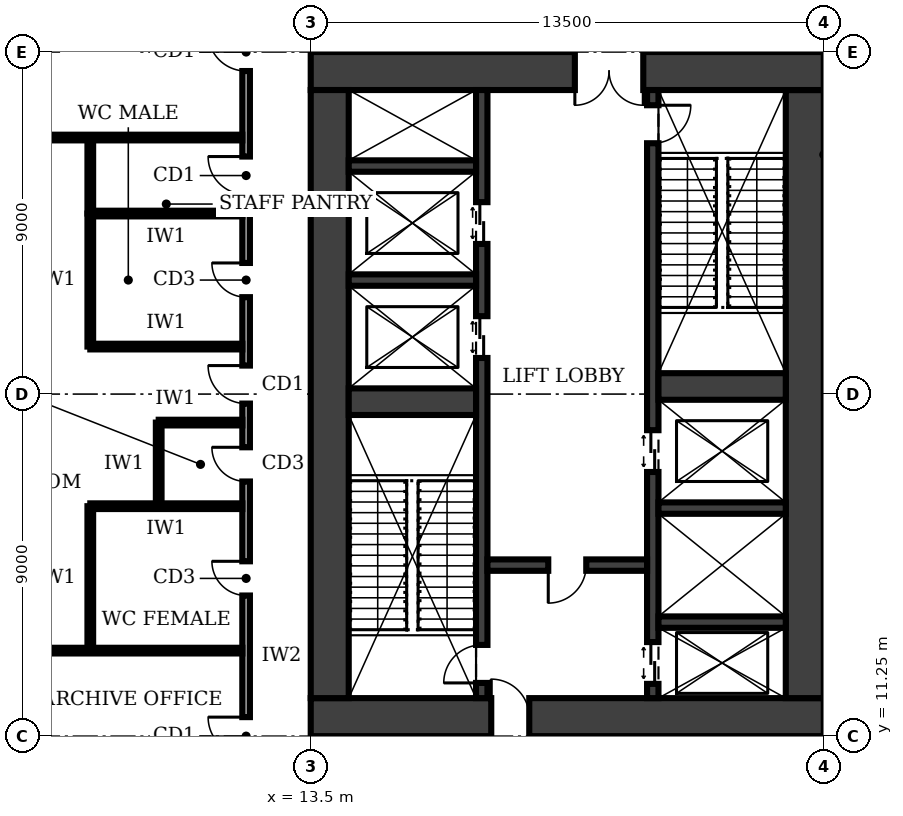
"""IFC4 building model, lengths in metres.
Left out: names, types, materials, properties, quantities, classifications, styles, units other than length and angle.
Written with IfcOpenShell. Run it as: python <this file> out.ifc"""

import sys

from ifc_helpers import new_model, si_unit, direction, frame, frame_2d, origin, place, context, subcontext, project, spatial, rectangle, extrude, element, fill, save


model = new_model("IFC4")
c1 = context("Model", 3, precision=1e-05, world=origin(), true_north=direction((0.0, 1.0)))
c2 = subcontext(c1, "Body", "Model", "MODEL_VIEW")
j1 = project(units=[si_unit("LENGTHUNIT", "METRE"), si_unit("PLANEANGLEUNIT", "RADIAN")], contexts=[c1])
p1 = place(None, origin())
s1 = spatial("IfcSite", under=j1, at=p1, CompositionType="ELEMENT")
p2 = place(p1, origin())
s2 = spatial("IfcBuilding", under=s1, at=p2, CompositionType="ELEMENT")
p3 = place(p2, frame((0.0, 0.0, 16.0)))
s3 = spatial("IfcBuildingStorey", under=s2, at=p3, CompositionType="ELEMENT", Elevation=16.0)
p4 = place(p3, frame((13.5, 11.75, 0.0), z_axis=(0.0, 0.0, 1.0), x_axis=(1.0, 0.0, 0.0)))
e1 = element("IfcWall", 1, at=p4, inside=s3, PredefinedType="SHEAR", context=c2, shape_type="SweptSolid", body=[
    extrude(rectangle(XDim=13.5, YDim=1.0, at=frame_2d((6.75, 0.0))), origin(), (0.0, 0.0, 1.0), 5.0),
])
p5 = place(p4, frame((4.75, 0.0, 0.0)))
e2 = element("IfcOpeningElement", 2, at=p5, cuts=e1, PredefinedType="OPENING", context=c2, shape_type="SweptSolid", body=[
    extrude(rectangle(XDim=1.0, YDim=2.1, at=frame_2d((0.5, 1.05))), frame((0.0, 0.51, 0.0), z_axis=(0.0, -1.0, 0.0), x_axis=(1.0, 0.0, 0.0)), (0.0, 0.0, 1.0), 1.02),
])
p6 = place(p3, frame((26.5, 12.25, 0.0), z_axis=(0.0, 0.0, 1.0), x_axis=(0.0, 1.0, 0.0)))
e3 = element("IfcWall", 3, at=p6, inside=s3, PredefinedType="SHEAR", context=c2, shape_type="SweptSolid", body=[
    extrude(rectangle(XDim=16.0, YDim=1.0, at=frame_2d((8.0, 0.0))), origin(), (0.0, 0.0, 1.0), 5.0),
])
p7 = place(p3, frame((27.0, 28.75, 0.0), z_axis=(0.0, 0.0, 1.0), x_axis=(-1.0, 0.0, 0.0)))
e4 = element("IfcWall", 4, at=p7, inside=s3, PredefinedType="SHEAR", context=c2, shape_type="SweptSolid", body=[
    extrude(rectangle(XDim=13.5, YDim=1.0, at=frame_2d((6.75, 0.0))), origin(), (0.0, 0.0, 1.0), 5.0),
])
p8 = place(p7, frame((4.75, 0.0, 0.0)))
e5 = element("IfcOpeningElement", 5, at=p8, cuts=e4, PredefinedType="OPENING", context=c2, shape_type="SweptSolid", body=[
    extrude(rectangle(XDim=1.8, YDim=2.1, at=frame_2d((0.9, 1.05))), frame((0.0, 0.51, 0.0), z_axis=(0.0, -1.0, 0.0), x_axis=(1.0, 0.0, 0.0)), (0.0, 0.0, 1.0), 1.02),
])
p9 = place(p3, frame((14.0, 28.25, 0.0), z_axis=(0.0, 0.0, 1.0), x_axis=(0.0, -1.0, 0.0)))
e6 = element("IfcWall", 6, at=p9, inside=s3, PredefinedType="SHEAR", context=c2, shape_type="SweptSolid", body=[
    extrude(rectangle(XDim=16.0, YDim=1.0, at=frame_2d((8.0, 0.0))), origin(), (0.0, 0.0, 1.0), 5.0),
])
p10 = place(p3, frame((18.0, 12.25, 0.0), z_axis=(0.0, 0.0, 1.0), x_axis=(0.0, 1.0, 0.0)))
e7 = element("IfcWall", 7, at=p10, inside=s3, PredefinedType="SHEAR", context=c2, shape_type="SweptSolid", body=[
    extrude(rectangle(XDim=16.0, YDim=0.3, at=frame_2d((8.0, 0.0))), origin(), (0.0, 0.0, 1.0), 5.0),
])
p11 = place(p10, frame((0.4, 0.0, 0.0)))
e8 = element("IfcOpeningElement", 8, at=p11, cuts=e7, PredefinedType="OPENING", context=c2, shape_type="SweptSolid", body=[
    extrude(rectangle(XDim=1.0, YDim=2.1, at=frame_2d((0.5, 1.05))), frame((0.0, 0.16, 0.0), z_axis=(0.0, -1.0, 0.0), x_axis=(1.0, 0.0, 0.0)), (0.0, 0.0, 1.0), 0.32),
])
p12 = place(p10, frame((8.95, 0.0, 0.0)))
e9 = element("IfcOpeningElement", 9, at=p12, cuts=e7, PredefinedType="OPENING", context=c2, shape_type="SweptSolid", body=[
    extrude(rectangle(XDim=1.1, YDim=2.1, at=frame_2d((0.55, 1.05))), frame((0.0, 0.16, 0.0), z_axis=(0.0, -1.0, 0.0), x_axis=(1.0, 0.0, 0.0)), (0.0, 0.0, 1.0), 0.32),
])
p13 = place(p10, frame((11.95, 0.0, 0.0)))
e10 = element("IfcOpeningElement", 10, at=p13, cuts=e7, PredefinedType="OPENING", context=c2, shape_type="SweptSolid", body=[
    extrude(rectangle(XDim=1.1, YDim=2.1, at=frame_2d((0.55, 1.05))), frame((0.0, 0.16, 0.0), z_axis=(0.0, -1.0, 0.0), x_axis=(1.0, 0.0, 0.0)), (0.0, 0.0, 1.0), 0.32),
])
p14 = place(p3, frame((22.5, 12.25, 0.0), z_axis=(0.0, 0.0, 1.0), x_axis=(0.0, 1.0, 0.0)))
e11 = element("IfcWall", 11, at=p14, inside=s3, PredefinedType="SHEAR", context=c2, shape_type="SweptSolid", body=[
    extrude(rectangle(XDim=16.0, YDim=0.3, at=frame_2d((8.0, 0.0))), origin(), (0.0, 0.0, 1.0), 5.0),
])
p15 = place(p14, frame((14.6, 0.0, 0.0)))
e12 = element("IfcOpeningElement", 12, at=p15, cuts=e11, PredefinedType="OPENING", context=c2, shape_type="SweptSolid", body=[
    extrude(rectangle(XDim=1.0, YDim=2.1, at=frame_2d((0.5, 1.05))), frame((0.0, 0.16, 0.0), z_axis=(0.0, -1.0, 0.0), x_axis=(1.0, 0.0, 0.0)), (0.0, 0.0, 1.0), 0.32),
])
p16 = place(p14, frame((0.375, 0.0, 0.0)))
e13 = element("IfcOpeningElement", 13, at=p16, cuts=e11, PredefinedType="OPENING", context=c2, shape_type="SweptSolid", body=[
    extrude(rectangle(XDim=1.1, YDim=2.1, at=frame_2d((0.55, 1.05))), frame((0.0, 0.16, 0.0), z_axis=(0.0, -1.0, 0.0), x_axis=(1.0, 0.0, 0.0)), (0.0, 0.0, 1.0), 0.32),
])
p17 = place(p14, frame((5.95, 0.0, 0.0)))
e14 = element("IfcOpeningElement", 14, at=p17, cuts=e11, PredefinedType="OPENING", context=c2, shape_type="SweptSolid", body=[
    extrude(rectangle(XDim=1.1, YDim=2.1, at=frame_2d((0.55, 1.05))), frame((0.0, 0.16, 0.0), z_axis=(0.0, -1.0, 0.0), x_axis=(1.0, 0.0, 0.0)), (0.0, 0.0, 1.0), 0.32),
])
p18 = place(p3, frame((14.5, 20.05, 0.0), z_axis=(0.0, 0.0, 1.0), x_axis=(1.0, 0.0, 0.0)))
e15 = element("IfcWall", 15, at=p18, inside=s3, PredefinedType="SHEAR", context=c2, shape_type="SweptSolid", body=[
    extrude(rectangle(XDim=3.35, YDim=0.7, at=frame_2d((1.675, 0.0))), origin(), (0.0, 0.0, 1.0), 5.0),
])
p19 = place(p3, frame((18.15, 15.75, 0.0), z_axis=(0.0, 0.0, 1.0), x_axis=(1.0, 0.0, 0.0)))
e16 = element("IfcWall", 16, at=p19, inside=s3, PredefinedType="SHEAR", context=c2, shape_type="SweptSolid", body=[
    extrude(rectangle(XDim=4.2, YDim=0.3, at=frame_2d((2.1, 0.0))), origin(), (0.0, 0.0, 1.0), 5.0),
])
p20 = place(p19, frame((1.6, 0.0, 0.0)))
e17 = element("IfcOpeningElement", 17, at=p20, cuts=e16, PredefinedType="OPENING", context=c2, shape_type="SweptSolid", body=[
    extrude(rectangle(XDim=1.0, YDim=2.1, at=frame_2d((0.5, 1.05))), frame((0.0, 0.16, 0.0), z_axis=(0.0, -1.0, 0.0), x_axis=(1.0, 0.0, 0.0)), (0.0, 0.0, 1.0), 0.32),
])
for number, where, z_axis, x_axis in (
    (18, (22.65, 14.25, 0.0), (0.0, 0.0, 1.0), (1.0, 0.0, 0.0)),
    (19, (22.65, 17.25, 0.0), (0.0, 0.0, 1.0), (1.0, 0.0, 0.0)),
):
    element("IfcWall", number, at=place(p3, frame(where, z_axis=z_axis, x_axis=x_axis)), inside=s3, PredefinedType="SHEAR", context=c2, shape_type="SweptSolid", body=[
        extrude(rectangle(XDim=3.35, YDim=0.3, at=frame_2d((1.675, 0.0))), origin(), (0.0, 0.0, 1.0), 5.0),
    ])
p21 = place(p3, frame((22.65, 20.45, 0.0), z_axis=(0.0, 0.0, 1.0), x_axis=(1.0, 0.0, 0.0)))
e20 = element("IfcWall", 20, at=p21, inside=s3, PredefinedType="SHEAR", context=c2, shape_type="SweptSolid", body=[
    extrude(rectangle(XDim=3.35, YDim=0.7, at=frame_2d((1.675, 0.0))), origin(), (0.0, 0.0, 1.0), 5.0),
])
for number, where, z_axis, x_axis in (
    (21, (14.5, 23.25, 0.0), (0.0, 0.0, 1.0), (1.0, 0.0, 0.0)),
    (22, (14.5, 26.25, 0.0), (0.0, 0.0, 1.0), (1.0, 0.0, 0.0)),
):
    element("IfcWall", number, at=place(p3, frame(where, z_axis=z_axis, x_axis=x_axis)), inside=s3, PredefinedType="SHEAR", context=c2, shape_type="SweptSolid", body=[
        extrude(rectangle(XDim=3.35, YDim=0.3, at=frame_2d((1.675, 0.0))), origin(), (0.0, 0.0, 1.0), 5.0),
    ])
p22 = place(p3, frame((11.8, 31.3, 0.0), z_axis=(0.0, 0.0, 1.0), x_axis=(0.0, -1.0, 0.0)))
e23 = element("IfcWall", 23, at=p22, inside=s3, PredefinedType="SOLIDWALL", context=c2, shape_type="SweptSolid", body=[
    extrude(rectangle(XDim=22.3, YDim=0.2, at=frame_2d((11.15, 0.0))), origin(), (0.0, 0.0, 1.0), 4.7),
])
p23 = place(p22, frame((19.55, 0.0, 0.0)))
e24 = element("IfcOpeningElement", 24, at=p23, cuts=e23, PredefinedType="OPENING", context=c2, shape_type="SweptSolid", body=[
    extrude(rectangle(XDim=1.0, YDim=2.1, at=frame_2d((0.5, 1.05))), frame((0.0, 0.11, 0.0), z_axis=(0.0, -1.0, 0.0), x_axis=(1.0, 0.0, 0.0)), (0.0, 0.0, 1.0), 0.22),
])
p24 = place(p22, frame((15.45, 0.0, 0.0)))
e25 = element("IfcOpeningElement", 25, at=p24, cuts=e23, PredefinedType="OPENING", context=c2, shape_type="SweptSolid", body=[
    extrude(rectangle(XDim=0.9, YDim=2.1, at=frame_2d((0.45, 1.05))), frame((0.0, 0.11, 0.0), z_axis=(0.0, -1.0, 0.0), x_axis=(1.0, 0.0, 0.0)), (0.0, 0.0, 1.0), 0.22),
])
p25 = place(p22, frame((12.45, 0.0, 0.0)))
e26 = element("IfcOpeningElement", 26, at=p25, cuts=e23, PredefinedType="OPENING", context=c2, shape_type="SweptSolid", body=[
    extrude(rectangle(XDim=0.9, YDim=2.1, at=frame_2d((0.45, 1.05))), frame((0.0, 0.11, 0.0), z_axis=(0.0, -1.0, 0.0), x_axis=(1.0, 0.0, 0.0)), (0.0, 0.0, 1.0), 0.22),
])
p26 = place(p22, frame((7.6, 0.0, 0.0)))
e27 = element("IfcOpeningElement", 27, at=p26, cuts=e23, PredefinedType="OPENING", context=c2, shape_type="SweptSolid", body=[
    extrude(rectangle(XDim=0.9, YDim=2.1, at=frame_2d((0.45, 1.05))), frame((0.0, 0.11, 0.0), z_axis=(0.0, -1.0, 0.0), x_axis=(1.0, 0.0, 0.0)), (0.0, 0.0, 1.0), 0.22),
])
p27 = place(p22, frame((4.8, 0.0, 0.0)))
e28 = element("IfcOpeningElement", 28, at=p27, cuts=e23, PredefinedType="OPENING", context=c2, shape_type="SweptSolid", body=[
    extrude(rectangle(XDim=1.0, YDim=2.1, at=frame_2d((0.5, 1.05))), frame((0.0, 0.11, 0.0), z_axis=(0.0, -1.0, 0.0), x_axis=(1.0, 0.0, 0.0)), (0.0, 0.0, 1.0), 0.22),
])
p28 = place(p22, frame((10.3, 0.0, 0.0)))
e29 = element("IfcOpeningElement", 29, at=p28, cuts=e23, PredefinedType="OPENING", context=c2, shape_type="SweptSolid", body=[
    extrude(rectangle(XDim=1.0, YDim=2.1, at=frame_2d((0.5, 1.05))), frame((0.0, 0.11, 0.0), z_axis=(0.0, -1.0, 0.0), x_axis=(1.0, 0.0, 0.0)), (0.0, 0.0, 1.0), 0.22),
])
p29 = place(p22, frame((1.55, 0.0, 0.0)))
e30 = element("IfcOpeningElement", 30, at=p29, cuts=e23, PredefinedType="OPENING", context=c2, shape_type="SweptSolid", body=[
    extrude(rectangle(XDim=1.0, YDim=2.1, at=frame_2d((0.5, 1.05))), frame((0.0, 0.11, 0.0), z_axis=(0.0, -1.0, 0.0), x_axis=(1.0, 0.0, 0.0)), (0.0, 0.0, 1.0), 0.22),
])
for number, where, z_axis, x_axis in (
    (31, (0.3, 13.5, 0.0), (0.0, 0.0, 1.0), (1.0, 0.0, 0.0)),
    (32, (0.3, 27.0, 0.0), (0.0, 0.0, 1.0), (1.0, 0.0, 0.0)),
):
    element("IfcWall", number, at=place(p3, frame(where, z_axis=z_axis, x_axis=x_axis)), inside=s3, PredefinedType="PARTITIONING", context=c2, shape_type="SweptSolid", body=[
        extrude(rectangle(XDim=11.4, YDim=0.15, at=frame_2d((5.7, 0.0))), origin(), (0.0, 0.0, 1.0), 4.7),
    ])
p30 = place(p3, frame((11.7, 17.3, 0.0), z_axis=(0.0, 0.0, 1.0), x_axis=(-1.0, 0.0, 0.0)))
e33 = element("IfcWall", 33, at=p30, inside=s3, PredefinedType="PARTITIONING", context=c2, shape_type="SweptSolid", body=[
    extrude(rectangle(XDim=4.0, YDim=0.15, at=frame_2d((2.0, 0.0))), origin(), (0.0, 0.0, 1.0), 4.7),
])
p31 = place(p3, frame((11.7, 19.5, 0.0), z_axis=(0.0, 0.0, 1.0), x_axis=(-1.0, 0.0, 0.0)))
e34 = element("IfcWall", 34, at=p31, inside=s3, PredefinedType="PARTITIONING", context=c2, shape_type="SweptSolid", body=[
    extrude(rectangle(XDim=2.2, YDim=0.15, at=frame_2d((1.1, 0.0))), origin(), (0.0, 0.0, 1.0), 3.8),
])
for number, where, z_axis, x_axis in (
    (35, (11.7, 21.5, 0.0), (0.0, 0.0, 1.0), (-1.0, 0.0, 0.0)),
    (36, (11.7, 25.0, 0.0), (0.0, 0.0, 1.0), (-1.0, 0.0, 0.0)),
):
    element("IfcWall", number, at=place(p3, frame(where, z_axis=z_axis, x_axis=x_axis)), inside=s3, PredefinedType="PARTITIONING", context=c2, shape_type="SweptSolid", body=[
        extrude(rectangle(XDim=4.0, YDim=0.15, at=frame_2d((2.0, 0.0))), origin(), (0.0, 0.0, 1.0), 4.7),
    ])
p32 = place(p3, frame((7.7, 13.5, 0.0), z_axis=(0.0, 0.0, 1.0), x_axis=(0.0, 1.0, 0.0)))
e37 = element("IfcWall", 37, at=p32, inside=s3, PredefinedType="PARTITIONING", context=c2, shape_type="SweptSolid", body=[
    extrude(rectangle(XDim=3.8, YDim=0.15, at=frame_2d((1.9, 0.0))), origin(), (0.0, 0.0, 1.0), 4.7),
])
p33 = place(p3, frame((9.5, 17.3, 0.0), z_axis=(0.0, 0.0, 1.0), x_axis=(0.0, 1.0, 0.0)))
e38 = element("IfcWall", 38, at=p33, inside=s3, PredefinedType="PARTITIONING", context=c2, shape_type="SweptSolid", body=[
    extrude(rectangle(XDim=2.2, YDim=0.15, at=frame_2d((1.1, 0.0))), origin(), (0.0, 0.0, 1.0), 4.7),
])
p34 = place(p3, frame((7.7, 21.5, 0.0), z_axis=(0.0, 0.0, 1.0), x_axis=(0.0, 1.0, 0.0)))
e39 = element("IfcWall", 39, at=p34, inside=s3, PredefinedType="PARTITIONING", context=c2, shape_type="SweptSolid", body=[
    extrude(rectangle(XDim=3.5, YDim=0.15, at=frame_2d((1.75, 0.0))), origin(), (0.0, 0.0, 1.0), 4.7),
])
p35 = place(p3, frame((7.7, 25.0, 0.0), z_axis=(0.0, 0.0, 1.0), x_axis=(0.0, 1.0, 0.0)))
e40 = element("IfcWall", 40, at=p35, inside=s3, PredefinedType="PARTITIONING", context=c2, shape_type="SweptSolid", body=[
    extrude(rectangle(XDim=2.0, YDim=0.15, at=frame_2d((1.0, 0.0))), origin(), (0.0, 0.0, 1.0), 4.7),
])
p36 = place(p5, origin())
e41 = element("IfcDoor", 41, at=p36, inside=s3, OperationType="SINGLE_SWING_LEFT", PredefinedType="DOOR", context=c2, shape_type="SweptSolid", body=[
    extrude(rectangle(XDim=1.0, YDim=2.1, at=frame_2d((0.5, 1.05))), frame((0.0, 0.025, 0.0), z_axis=(0.0, -1.0, 0.0), x_axis=(1.0, 0.0, 0.0)), (0.0, 0.0, 1.0), 0.05),
])
fill(e2, e41)
p37 = place(p8, origin())
e42 = element("IfcDoor", 42, at=p37, inside=s3, OperationType="DOUBLE_DOOR_SINGLE_SWING", PredefinedType="DOOR", context=c2, shape_type="SweptSolid", body=[
    extrude(rectangle(XDim=1.8, YDim=2.1, at=frame_2d((0.9, 1.05))), frame((0.0, 0.025, 0.0), z_axis=(0.0, -1.0, 0.0), x_axis=(1.0, 0.0, 0.0)), (0.0, 0.0, 1.0), 0.05),
])
fill(e5, e42)
p38 = place(p20, frame((1.0, 0.0, 0.0), z_axis=(0.0, 0.0, 1.0), x_axis=(-1.0, 0.0, 0.0)))
e43 = element("IfcDoor", 43, at=p38, inside=s3, OperationType="SINGLE_SWING_RIGHT", PredefinedType="DOOR", context=c2, shape_type="SweptSolid", body=[
    extrude(rectangle(XDim=1.0, YDim=2.1, at=frame_2d((0.5, 1.05))), frame((0.0, 0.025, 0.0), z_axis=(0.0, -1.0, 0.0), x_axis=(1.0, 0.0, 0.0)), (0.0, 0.0, 1.0), 0.05),
])
fill(e17, e43)
p39 = place(p11, origin())
e44 = element("IfcDoor", 44, at=p39, inside=s3, OperationType="SINGLE_SWING_LEFT", PredefinedType="DOOR", context=c2, shape_type="SweptSolid", body=[
    extrude(rectangle(XDim=1.0, YDim=2.1, at=frame_2d((0.5, 1.05))), frame((0.0, 0.025, 0.0), z_axis=(0.0, -1.0, 0.0), x_axis=(1.0, 0.0, 0.0)), (0.0, 0.0, 1.0), 0.05),
])
fill(e8, e44)
p40 = place(p15, frame((1.0, 0.0, 0.0), z_axis=(0.0, 0.0, 1.0), x_axis=(-1.0, 0.0, 0.0)))
e45 = element("IfcDoor", 45, at=p40, inside=s3, OperationType="SINGLE_SWING_LEFT", PredefinedType="DOOR", context=c2, shape_type="SweptSolid", body=[
    extrude(rectangle(XDim=1.0, YDim=2.1, at=frame_2d((0.5, 1.05))), frame((0.0, 0.025, 0.0), z_axis=(0.0, -1.0, 0.0), x_axis=(1.0, 0.0, 0.0)), (0.0, 0.0, 1.0), 0.05),
])
fill(e12, e45)
p41 = place(p16, origin())
e46 = element("IfcDoor", 46, at=p41, inside=s3, OperationType="DOUBLE_DOOR_SLIDING", PredefinedType="DOOR", context=c2, shape_type="SweptSolid", body=[
    extrude(rectangle(XDim=1.1, YDim=2.1, at=frame_2d((0.55, 1.05))), frame((0.0, 0.025, 0.0), z_axis=(0.0, -1.0, 0.0), x_axis=(1.0, 0.0, 0.0)), (0.0, 0.0, 1.0), 0.05),
])
fill(e13, e46)
p42 = place(p12, origin())
e47 = element("IfcDoor", 47, at=p42, inside=s3, OperationType="DOUBLE_DOOR_SLIDING", PredefinedType="DOOR", context=c2, shape_type="SweptSolid", body=[
    extrude(rectangle(XDim=1.1, YDim=2.1, at=frame_2d((0.55, 1.05))), frame((0.0, 0.025, 0.0), z_axis=(0.0, -1.0, 0.0), x_axis=(1.0, 0.0, 0.0)), (0.0, 0.0, 1.0), 0.05),
])
fill(e9, e47)
p43 = place(p13, origin())
e48 = element("IfcDoor", 48, at=p43, inside=s3, OperationType="DOUBLE_DOOR_SLIDING", PredefinedType="DOOR", context=c2, shape_type="SweptSolid", body=[
    extrude(rectangle(XDim=1.1, YDim=2.1, at=frame_2d((0.55, 1.05))), frame((0.0, 0.025, 0.0), z_axis=(0.0, -1.0, 0.0), x_axis=(1.0, 0.0, 0.0)), (0.0, 0.0, 1.0), 0.05),
])
fill(e10, e48)
p44 = place(p17, origin())
e49 = element("IfcDoor", 49, at=p44, inside=s3, OperationType="DOUBLE_DOOR_SLIDING", PredefinedType="DOOR", context=c2, shape_type="SweptSolid", body=[
    extrude(rectangle(XDim=1.1, YDim=2.1, at=frame_2d((0.55, 1.05))), frame((0.0, 0.025, 0.0), z_axis=(0.0, -1.0, 0.0), x_axis=(1.0, 0.0, 0.0)), (0.0, 0.0, 1.0), 0.05),
])
fill(e14, e49)
p45 = place(p23, frame((1.0, 0.0, 0.0), z_axis=(0.0, 0.0, 1.0), x_axis=(-1.0, 0.0, 0.0)))
e50 = element("IfcDoor", 50, at=p45, inside=s3, OperationType="SINGLE_SWING_RIGHT", PredefinedType="DOOR", context=c2, shape_type="SweptSolid", body=[
    extrude(rectangle(XDim=1.0, YDim=2.1, at=frame_2d((0.5, 1.05))), frame((0.0, 0.025, 0.0), z_axis=(0.0, -1.0, 0.0), x_axis=(1.0, 0.0, 0.0)), (0.0, 0.0, 1.0), 0.05),
])
fill(e24, e50)
p46 = place(p24, frame((0.9, 0.0, 0.0), z_axis=(0.0, 0.0, 1.0), x_axis=(-1.0, 0.0, 0.0)))
e51 = element("IfcDoor", 51, at=p46, inside=s3, OperationType="SINGLE_SWING_RIGHT", PredefinedType="DOOR", context=c2, shape_type="SweptSolid", body=[
    extrude(rectangle(XDim=0.9, YDim=2.1, at=frame_2d((0.45, 1.05))), frame((0.0, 0.025, 0.0), z_axis=(0.0, -1.0, 0.0), x_axis=(1.0, 0.0, 0.0)), (0.0, 0.0, 1.0), 0.05),
])
fill(e25, e51)
p47 = place(p25, frame((0.9, 0.0, 0.0), z_axis=(0.0, 0.0, 1.0), x_axis=(-1.0, 0.0, 0.0)))
e52 = element("IfcDoor", 52, at=p47, inside=s3, OperationType="SINGLE_SWING_RIGHT", PredefinedType="DOOR", context=c2, shape_type="SweptSolid", body=[
    extrude(rectangle(XDim=0.9, YDim=2.1, at=frame_2d((0.45, 1.05))), frame((0.0, 0.025, 0.0), z_axis=(0.0, -1.0, 0.0), x_axis=(1.0, 0.0, 0.0)), (0.0, 0.0, 1.0), 0.05),
])
fill(e26, e52)
p48 = place(p26, frame((0.9, 0.0, 0.0), z_axis=(0.0, 0.0, 1.0), x_axis=(-1.0, 0.0, 0.0)))
e53 = element("IfcDoor", 53, at=p48, inside=s3, OperationType="SINGLE_SWING_RIGHT", PredefinedType="DOOR", context=c2, shape_type="SweptSolid", body=[
    extrude(rectangle(XDim=0.9, YDim=2.1, at=frame_2d((0.45, 1.05))), frame((0.0, 0.025, 0.0), z_axis=(0.0, -1.0, 0.0), x_axis=(1.0, 0.0, 0.0)), (0.0, 0.0, 1.0), 0.05),
])
fill(e27, e53)
p49 = place(p27, frame((1.0, 0.0, 0.0), z_axis=(0.0, 0.0, 1.0), x_axis=(-1.0, 0.0, 0.0)))
e54 = element("IfcDoor", 54, at=p49, inside=s3, OperationType="SINGLE_SWING_RIGHT", PredefinedType="DOOR", context=c2, shape_type="SweptSolid", body=[
    extrude(rectangle(XDim=1.0, YDim=2.1, at=frame_2d((0.5, 1.05))), frame((0.0, 0.025, 0.0), z_axis=(0.0, -1.0, 0.0), x_axis=(1.0, 0.0, 0.0)), (0.0, 0.0, 1.0), 0.05),
])
fill(e28, e54)
p50 = place(p28, frame((1.0, 0.0, 0.0), z_axis=(0.0, 0.0, 1.0), x_axis=(-1.0, 0.0, 0.0)))
e55 = element("IfcDoor", 55, at=p50, inside=s3, OperationType="SINGLE_SWING_RIGHT", PredefinedType="DOOR", context=c2, shape_type="SweptSolid", body=[
    extrude(rectangle(XDim=1.0, YDim=2.1, at=frame_2d((0.5, 1.05))), frame((0.0, 0.025, 0.0), z_axis=(0.0, -1.0, 0.0), x_axis=(1.0, 0.0, 0.0)), (0.0, 0.0, 1.0), 0.05),
])
fill(e29, e55)
p51 = place(p29, frame((1.0, 0.0, 0.0), z_axis=(0.0, 0.0, 1.0), x_axis=(-1.0, 0.0, 0.0)))
e56 = element("IfcDoor", 56, at=p51, inside=s3, OperationType="SINGLE_SWING_RIGHT", PredefinedType="DOOR", context=c2, shape_type="SweptSolid", body=[
    extrude(rectangle(XDim=1.0, YDim=2.1, at=frame_2d((0.5, 1.05))), frame((0.0, 0.025, 0.0), z_axis=(0.0, -1.0, 0.0), x_axis=(1.0, 0.0, 0.0)), (0.0, 0.0, 1.0), 0.05),
])
fill(e30, e56)
save(model, sys.argv[1])
